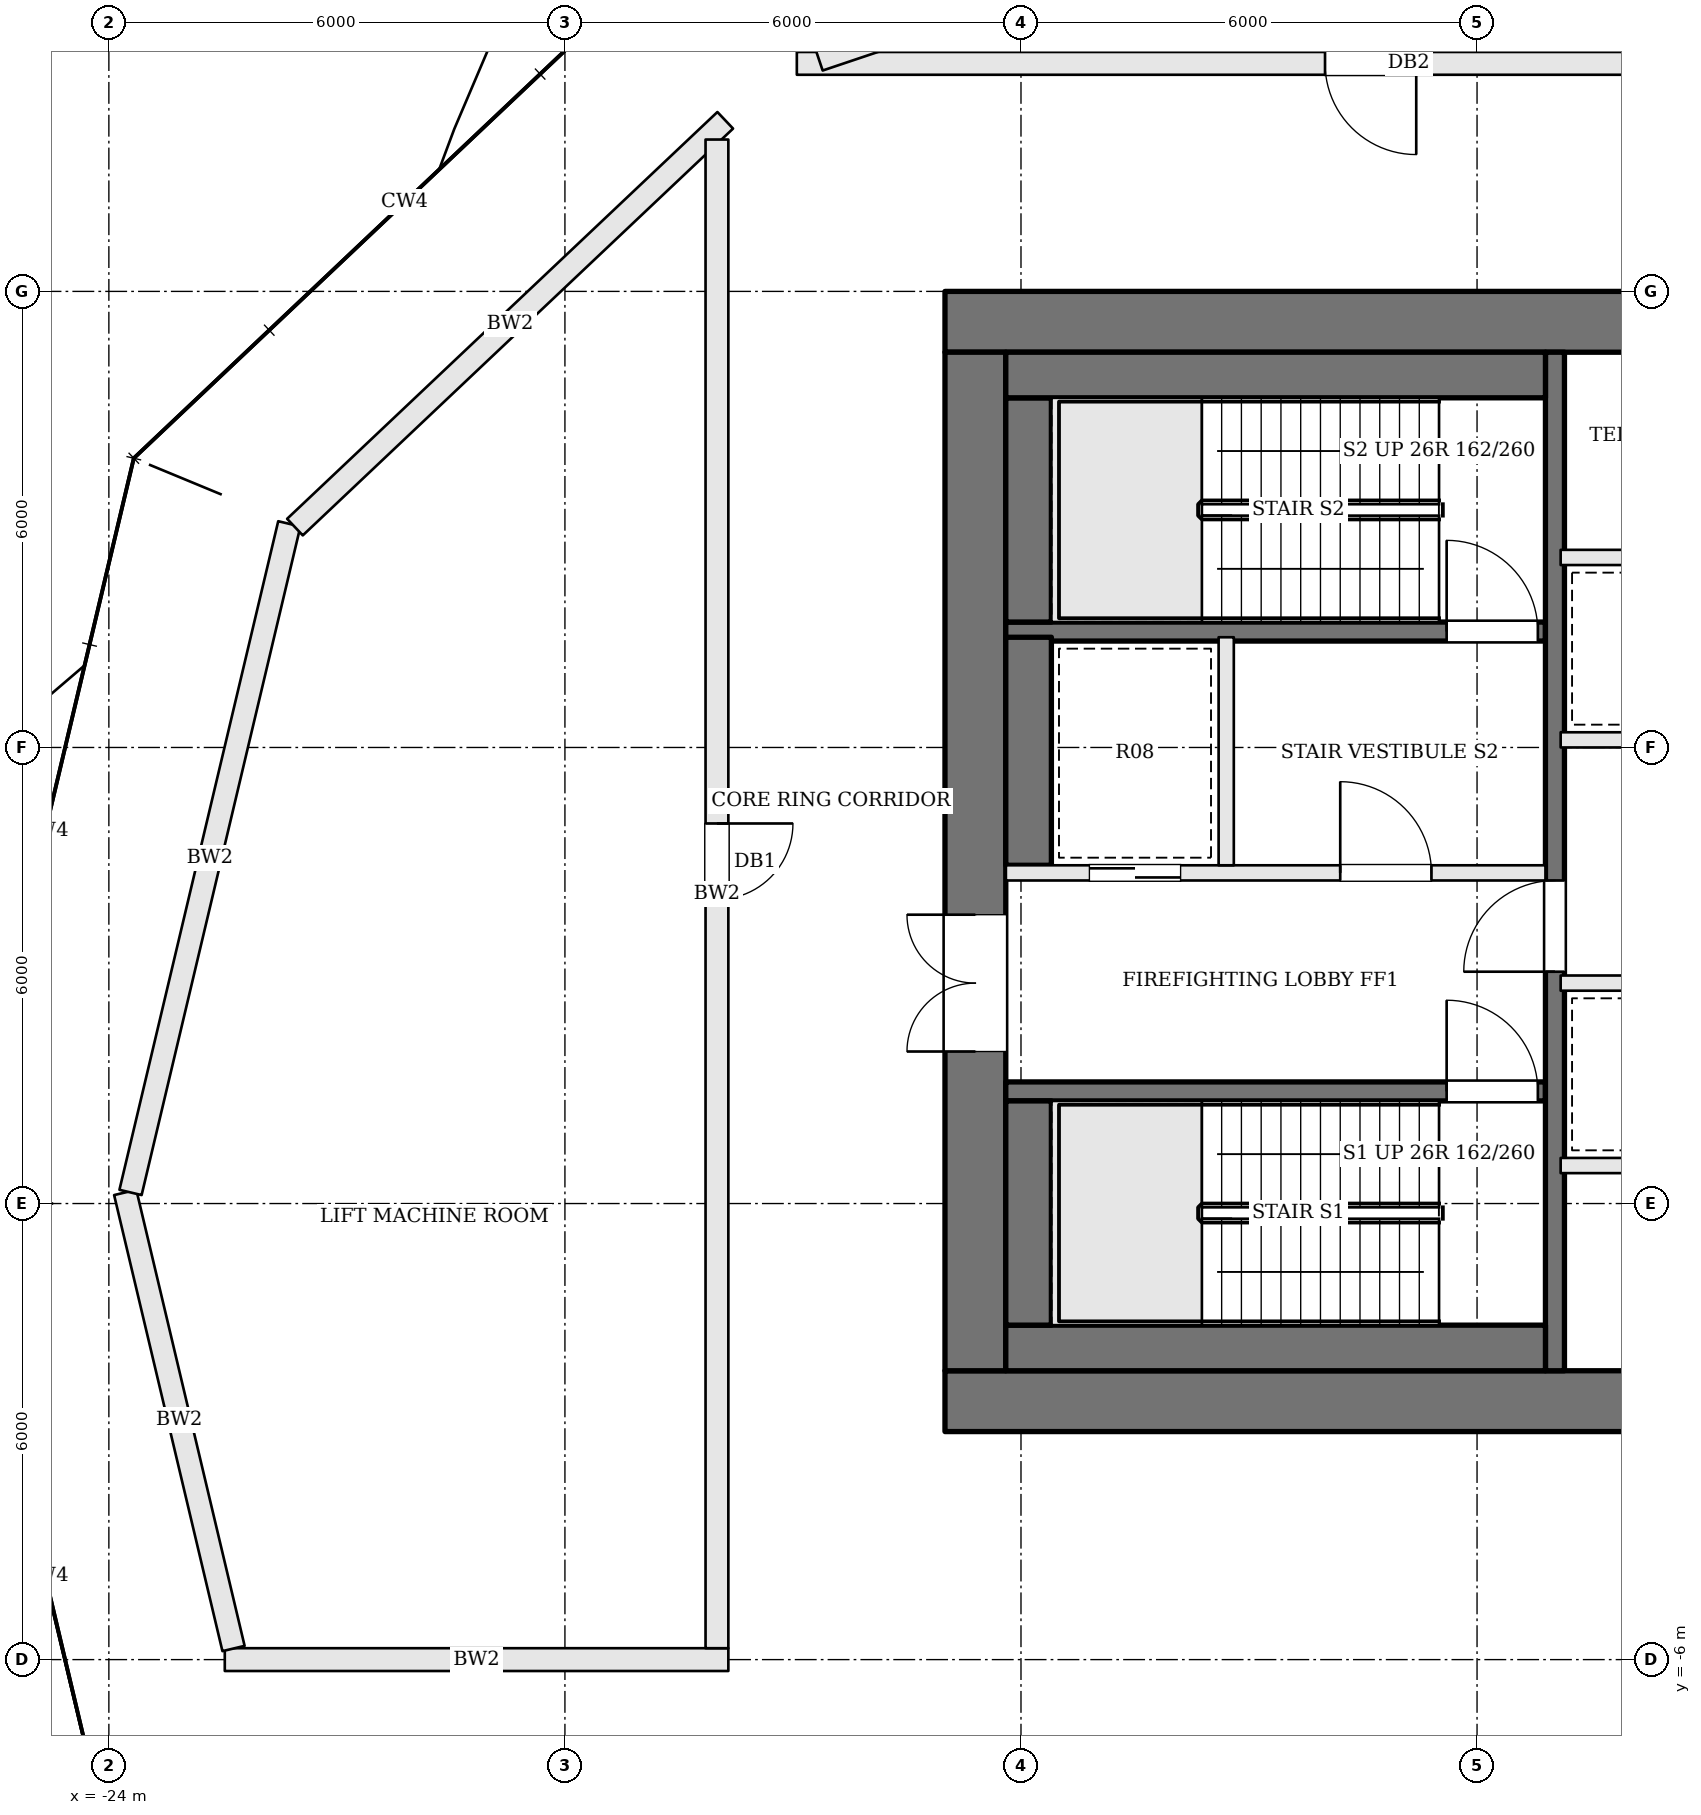
"""IFC4 building model, lengths in metres.
Left out: names, types, materials, properties, quantities, classifications, styles, units other than length and angle.
Written with IfcOpenShell. Run it as: python <this file> out.ifc"""

import sys

from ifc_helpers import new_model, si_unit, direction, frame, frame_2d, origin, place, context, subcontext, project, spatial, rectangle, extrude, element, fill, save


model = new_model("IFC4")
c1 = context("Model", 3, precision=1e-05, world=origin(), true_north=direction((0.0, 1.0)))
c2 = subcontext(c1, "Body", "Model", "MODEL_VIEW")
j1 = project(units=[si_unit("LENGTHUNIT", "METRE"), si_unit("PLANEANGLEUNIT", "RADIAN")], contexts=[c1])
p1 = place(None, origin())
s1 = spatial("IfcSite", under=j1, at=p1, CompositionType="ELEMENT")
p2 = place(p1, origin())
s2 = spatial("IfcBuilding", under=s1, at=p2, CompositionType="ELEMENT")
p3 = place(p2, frame((0.0, 0.0, 307.8)))
s3 = spatial("IfcBuildingStorey", under=s2, at=p3, CompositionType="ELEMENT", Elevation=307.8)
p4 = place(p3, frame((-13.0, 11.6, 0.0), z_axis=(0.0, 0.0, 1.0), x_axis=(1.0, 0.0, 0.0)))
e1 = element("IfcWall", 1, at=p4, inside=s3, PredefinedType="SHEAR", context=c2, shape_type="SweptSolid", body=[
    extrude(rectangle(XDim=26.0, YDim=0.8, at=frame_2d((13.0, 0.0))), origin(), (0.0, 0.0, 1.0), 4.2),
])
p5 = place(p4, frame((9.375, 0.0, 0.0)))
e2 = element("IfcOpeningElement", 2, at=p5, cuts=e1, PredefinedType="OPENING", context=c2, shape_type="SweptSolid", body=[
    extrude(rectangle(XDim=0.7, YDim=2.1, at=frame_2d((0.35, 1.05))), frame((0.0, 0.41, 0.0), z_axis=(0.0, -1.0, 0.0), x_axis=(1.0, 0.0, 0.0)), (0.0, 0.0, 1.0), 0.82),
])
p6 = place(p4, frame((12.375, 0.0, 0.0)))
e3 = element("IfcOpeningElement", 3, at=p6, cuts=e1, PredefinedType="OPENING", context=c2, shape_type="SweptSolid", body=[
    extrude(rectangle(XDim=1.2, YDim=2.1, at=frame_2d((0.6, 1.05))), frame((0.0, 0.41, 0.0), z_axis=(0.0, -1.0, 0.0), x_axis=(1.0, 0.0, 0.0)), (0.0, 0.0, 1.0), 0.82),
])
p7 = place(p4, frame((15.9, 0.0, 0.0)))
e4 = element("IfcOpeningElement", 4, at=p7, cuts=e1, PredefinedType="OPENING", context=c2, shape_type="SweptSolid", body=[
    extrude(rectangle(XDim=0.7, YDim=2.1, at=frame_2d((0.35, 1.05))), frame((0.0, 0.41, 0.0), z_axis=(0.0, -1.0, 0.0), x_axis=(1.0, 0.0, 0.0)), (0.0, 0.0, 1.0), 0.82),
])
p8 = place(p3, frame((-13.0, -2.6, 0.0), z_axis=(0.0, 0.0, 1.0), x_axis=(1.0, 0.0, 0.0)))
e5 = element("IfcWall", 5, at=p8, inside=s3, PredefinedType="SHEAR", context=c2, shape_type="SweptSolid", body=[
    extrude(rectangle(XDim=26.0, YDim=0.8, at=frame_2d((13.0, 0.0))), origin(), (0.0, 0.0, 1.0), 4.2),
])
p9 = place(p8, frame((9.125, 0.0, 0.0)))
e6 = element("IfcOpeningElement", 6, at=p9, cuts=e5, PredefinedType="OPENING", context=c2, shape_type="SweptSolid", body=[
    extrude(rectangle(XDim=1.2, YDim=2.1, at=frame_2d((0.6, 1.05))), frame((0.0, 0.41, 0.0), z_axis=(0.0, -1.0, 0.0), x_axis=(1.0, 0.0, 0.0)), (0.0, 0.0, 1.0), 0.82),
])
p10 = place(p8, frame((12.375, 0.0, 0.0)))
e7 = element("IfcOpeningElement", 7, at=p10, cuts=e5, PredefinedType="OPENING", context=c2, shape_type="SweptSolid", body=[
    extrude(rectangle(XDim=1.2, YDim=2.1, at=frame_2d((0.6, 1.05))), frame((0.0, 0.41, 0.0), z_axis=(0.0, -1.0, 0.0), x_axis=(1.0, 0.0, 0.0)), (0.0, 0.0, 1.0), 0.82),
])
p11 = place(p8, frame((15.9, 0.0, 0.0)))
e8 = element("IfcOpeningElement", 8, at=p11, cuts=e5, PredefinedType="OPENING", context=c2, shape_type="SweptSolid", body=[
    extrude(rectangle(XDim=0.7, YDim=2.1, at=frame_2d((0.35, 1.05))), frame((0.0, 0.41, 0.0), z_axis=(0.0, -1.0, 0.0), x_axis=(1.0, 0.0, 0.0)), (0.0, 0.0, 1.0), 0.82),
])
p12 = place(p3, frame((-12.6, -2.2, 0.0), z_axis=(0.0, 0.0, 1.0), x_axis=(0.0, 1.0, 0.0)))
e9 = element("IfcWall", 9, at=p12, inside=s3, PredefinedType="SHEAR", context=c2, shape_type="SweptSolid", body=[
    extrude(rectangle(XDim=13.4, YDim=0.8, at=frame_2d((6.7, 0.0))), origin(), (0.0, 0.0, 1.0), 4.2),
])
p13 = place(p12, frame((4.2, 0.0, 0.0)))
e10 = element("IfcOpeningElement", 10, at=p13, cuts=e9, PredefinedType="OPENING", context=c2, shape_type="SweptSolid", body=[
    extrude(rectangle(XDim=1.8, YDim=2.1, at=frame_2d((0.9, 1.05))), frame((0.0, 0.41, 0.0), z_axis=(0.0, -1.0, 0.0), x_axis=(1.0, 0.0, 0.0)), (0.0, 0.0, 1.0), 0.82),
])
p14 = place(p3, frame((-12.2, 1.475, 0.0), z_axis=(0.0, 0.0, 1.0), x_axis=(1.0, 0.0, 0.0)))
e11 = element("IfcWall", 11, at=p14, inside=s3, PredefinedType="SOLIDWALL", context=c2, shape_type="SweptSolid", body=[
    extrude(rectangle(XDim=7.1, YDim=0.25, at=frame_2d((3.55, 0.0))), origin(), (0.0, 0.0, 1.0), 4.0),
])
p15 = place(p14, frame((5.8, 0.0, 0.0)))
e12 = element("IfcOpeningElement", 12, at=p15, cuts=e11, PredefinedType="OPENING", context=c2, shape_type="SweptSolid", body=[
    extrude(rectangle(XDim=1.2, YDim=2.1, at=frame_2d((0.6, 1.05))), frame((0.0, 0.135, 0.0), z_axis=(0.0, -1.0, 0.0), x_axis=(1.0, 0.0, 0.0)), (0.0, 0.0, 1.0), 0.27),
])
p16 = place(p3, frame((-12.2, 4.35, 0.0), z_axis=(0.0, 0.0, 1.0), x_axis=(1.0, 0.0, 0.0)))
e13 = element("IfcWall", 13, at=p16, inside=s3, PredefinedType="SOLIDWALL", context=c2, shape_type="SweptSolid", body=[
    extrude(rectangle(XDim=7.1, YDim=0.2, at=frame_2d((3.55, 0.0))), origin(), (0.0, 0.0, 1.0), 4.0),
])
p17 = place(p16, frame((4.4, 0.0, 0.0)))
e14 = element("IfcOpeningElement", 14, at=p17, cuts=e13, PredefinedType="OPENING", context=c2, shape_type="SweptSolid", body=[
    extrude(rectangle(XDim=1.2, YDim=2.1, at=frame_2d((0.6, 1.05))), frame((0.0, 0.11, 0.0), z_axis=(0.0, -1.0, 0.0), x_axis=(1.0, 0.0, 0.0)), (0.0, 0.0, 1.0), 0.22),
])
p18 = place(p16, frame((1.1, 0.0, 0.0)))
e15 = element("IfcOpeningElement", 15, at=p18, cuts=e13, PredefinedType="OPENING", context=c2, shape_type="SweptSolid", body=[
    extrude(rectangle(XDim=1.2, YDim=2.1, at=frame_2d((0.6, 1.05))), frame((0.0, 0.11, 0.0), z_axis=(0.0, -1.0, 0.0), x_axis=(1.0, 0.0, 0.0)), (0.0, 0.0, 1.0), 0.22),
])
p19 = place(p3, frame((-12.2, 7.525, 0.0), z_axis=(0.0, 0.0, 1.0), x_axis=(1.0, 0.0, 0.0)))
e16 = element("IfcWall", 16, at=p19, inside=s3, PredefinedType="SOLIDWALL", context=c2, shape_type="SweptSolid", body=[
    extrude(rectangle(XDim=7.1, YDim=0.25, at=frame_2d((3.55, 0.0))), origin(), (0.0, 0.0, 1.0), 4.0),
])
p20 = place(p19, frame((5.8, 0.0, 0.0)))
e17 = element("IfcOpeningElement", 17, at=p20, cuts=e16, PredefinedType="OPENING", context=c2, shape_type="SweptSolid", body=[
    extrude(rectangle(XDim=1.2, YDim=2.1, at=frame_2d((0.6, 1.05))), frame((0.0, 0.135, 0.0), z_axis=(0.0, -1.0, 0.0), x_axis=(1.0, 0.0, 0.0)), (0.0, 0.0, 1.0), 0.27),
])
p21 = place(p3, frame((-9.3, 4.45, 0.0), z_axis=(0.0, 0.0, 1.0), x_axis=(0.0, 1.0, 0.0)))
e18 = element("IfcWall", 18, at=p21, inside=s3, PredefinedType="SOLIDWALL", context=c2, shape_type="SweptSolid", body=[
    extrude(rectangle(XDim=3.0, YDim=0.2, at=frame_2d((1.5, 0.0))), origin(), (0.0, 0.0, 1.0), 4.0),
])
p22 = place(p3, frame((-4.975, -2.2, 0.0), z_axis=(0.0, 0.0, 1.0), x_axis=(0.0, 1.0, 0.0)))
e19 = element("IfcWall", 19, at=p22, inside=s3, PredefinedType="SOLIDWALL", context=c2, shape_type="SweptSolid", body=[
    extrude(rectangle(XDim=13.4, YDim=0.25, at=frame_2d((6.7, 0.0))), origin(), (0.0, 0.0, 1.0), 4.0),
])
p23 = place(p22, frame((5.25, 0.0, 0.0)))
e20 = element("IfcOpeningElement", 20, at=p23, cuts=e19, PredefinedType="OPENING", context=c2, shape_type="SweptSolid", body=[
    extrude(rectangle(XDim=1.2, YDim=2.1, at=frame_2d((0.6, 1.05))), frame((0.0, 0.135, 0.0), z_axis=(0.0, -1.0, 0.0), x_axis=(1.0, 0.0, 0.0)), (0.0, 0.0, 1.0), 0.27),
])
p24 = place(p3, frame((-12.2, -1.9, 0.0), z_axis=(0.0, 0.0, 1.0), x_axis=(1.0, 0.0, 0.0)))
e21 = element("IfcWall", 21, at=p24, inside=s3, PredefinedType="SOLIDWALL", context=c2, shape_type="SweptSolid", body=[
    extrude(rectangle(XDim=7.1, YDim=0.6, at=frame_2d((3.55, 0.0))), origin(), (0.0, 0.0, 1.0), 4.0),
])
p25 = place(p3, frame((-11.9, -1.6, 0.0), z_axis=(0.0, 0.0, 1.0), x_axis=(0.0, 1.0, 0.0)))
e22 = element("IfcWall", 22, at=p25, inside=s3, PredefinedType="SOLIDWALL", context=c2, shape_type="SweptSolid", body=[
    extrude(rectangle(XDim=2.95, YDim=0.6, at=frame_2d((1.475, 0.0))), origin(), (0.0, 0.0, 1.0), 4.0),
])
p26 = place(p3, frame((-11.9, 4.45, 0.0), z_axis=(0.0, 0.0, 1.0), x_axis=(0.0, 1.0, 0.0)))
e23 = element("IfcWall", 23, at=p26, inside=s3, PredefinedType="SOLIDWALL", context=c2, shape_type="SweptSolid", body=[
    extrude(rectangle(XDim=3.0, YDim=0.6, at=frame_2d((1.5, 0.0))), origin(), (0.0, 0.0, 1.0), 4.0),
])
p27 = place(p3, frame((-11.9, 7.65, 0.0), z_axis=(0.0, 0.0, 1.0), x_axis=(0.0, 1.0, 0.0)))
e24 = element("IfcWall", 24, at=p27, inside=s3, PredefinedType="SOLIDWALL", context=c2, shape_type="SweptSolid", body=[
    extrude(rectangle(XDim=2.95, YDim=0.6, at=frame_2d((1.475, 0.0))), origin(), (0.0, 0.0, 1.0), 4.0),
])
p28 = place(p3, frame((-12.2, 10.9, 0.0), z_axis=(0.0, 0.0, 1.0), x_axis=(1.0, 0.0, 0.0)))
e25 = element("IfcWall", 25, at=p28, inside=s3, PredefinedType="SOLIDWALL", context=c2, shape_type="SweptSolid", body=[
    extrude(rectangle(XDim=7.1, YDim=0.6, at=frame_2d((3.55, 0.0))), origin(), (0.0, 0.0, 1.0), 4.0),
])
p29 = place(p3, frame((-4.9, 0.5, 0.0), z_axis=(0.0, 0.0, 1.0), x_axis=(1.0, 0.0, 0.0)))
e26 = element("IfcWall", 26, at=p29, inside=s3, PredefinedType="SOLIDWALL", context=c2, shape_type="SweptSolid", body=[
    extrude(rectangle(XDim=9.8, YDim=0.2, at=frame_2d((4.9, 0.0))), origin(), (0.0, 0.0, 1.0), 4.0),
])
p30 = place(p3, frame((-4.9, 2.9, 0.0), z_axis=(0.0, 0.0, 1.0), x_axis=(1.0, 0.0, 0.0)))
e27 = element("IfcWall", 27, at=p30, inside=s3, PredefinedType="SOLIDWALL", context=c2, shape_type="SweptSolid", body=[
    extrude(rectangle(XDim=9.8, YDim=0.2, at=frame_2d((4.9, 0.0))), origin(), (0.0, 0.0, 1.0), 4.0),
])
p31 = place(p30, frame((2.613, 0.0, 0.0)))
e28 = element("IfcOpeningElement", 28, at=p31, cuts=e27, PredefinedType="OPENING", context=c2, shape_type="SweptSolid", body=[
    extrude(rectangle(XDim=0.9, YDim=2.1, at=frame_2d((0.45, 1.05))), frame((0.0, 0.11, 0.0), z_axis=(0.0, -1.0, 0.0), x_axis=(1.0, 0.0, 0.0)), (0.0, 0.0, 1.0), 0.22),
])
p32 = place(p30, frame((7.463, 0.0, 0.0)))
e29 = element("IfcOpeningElement", 29, at=p32, cuts=e27, PredefinedType="OPENING", context=c2, shape_type="SweptSolid", body=[
    extrude(rectangle(XDim=1.0, YDim=2.1, at=frame_2d((0.5, 1.05))), frame((0.0, 0.11, 0.0), z_axis=(0.0, -1.0, 0.0), x_axis=(1.0, 0.0, 0.0)), (0.0, 0.0, 1.0), 0.22),
])
for number, where, z_axis, x_axis in (
    (30, (-4.9, 6.1, 0.0), (0.0, 0.0, 1.0), (1.0, 0.0, 0.0)),
    (31, (-4.9, 8.5, 0.0), (0.0, 0.0, 1.0), (1.0, 0.0, 0.0)),
):
    element("IfcWall", number, at=place(p3, frame(where, z_axis=z_axis, x_axis=x_axis)), inside=s3, PredefinedType="SOLIDWALL", context=c2, shape_type="SweptSolid", body=[
        extrude(rectangle(XDim=9.8, YDim=0.2, at=frame_2d((4.9, 0.0))), origin(), (0.0, 0.0, 1.0), 4.0),
    ])
p33 = place(p3, frame((-15.85, -6.0, 0.0), z_axis=(0.0, 0.0, 1.0), x_axis=(-1.0, 0.0, 0.0)))
e32 = element("IfcWall", 32, at=p33, inside=s3, PredefinedType="SOLIDWALL", context=c2, shape_type="SweptSolid", body=[
    extrude(rectangle(XDim=6.625, YDim=0.3, at=frame_2d((3.312, 0.0))), origin(), (0.0, 0.0, 1.0), 3.484),
])
p34 = place(p3, frame((-22.36, -5.854, 0.0), z_axis=(0.0, 0.0, 1.0), x_axis=(-0.231042450417, 0.972943670572, 0.0)))
e33 = element("IfcWall", 33, at=p34, inside=s3, PredefinedType="SOLIDWALL", context=c2, shape_type="SweptSolid", body=[
    extrude(rectangle(XDim=6.167, YDim=0.3, at=frame_2d((3.083, 0.0))), origin(), (0.0, 0.0, 1.0), 3.484),
])
p35 = place(p3, frame((-23.715, 0.146, 0.0), z_axis=(0.0, 0.0, 1.0), x_axis=(0.231081377849, 0.972934425751, 0.0)))
e34 = element("IfcWall", 34, at=p35, inside=s3, PredefinedType="SOLIDWALL", context=c2, shape_type="SweptSolid", body=[
    extrude(rectangle(XDim=9.041, YDim=0.3, at=frame_2d((4.52, 0.0))), origin(), (0.0, 0.0, 1.0), 3.484),
])
p36 = place(p3, frame((-21.552, 8.899, 0.0), z_axis=(0.0, 0.0, 1.0), x_axis=(0.726650636751, 0.687007170348, 0.0)))
e35 = element("IfcWall", 35, at=p36, inside=s3, PredefinedType="SOLIDWALL", context=c2, shape_type="SweptSolid", body=[
    extrude(rectangle(XDim=7.79, YDim=0.3, at=frame_2d((3.895, 0.0))), origin(), (0.0, 0.0, 1.0), 3.484),
])
p37 = place(p3, frame((-16.0, 13.998, 0.0), z_axis=(0.0, 0.0, 1.0), x_axis=(0.0, -1.0, 0.0)))
e36 = element("IfcWall", 36, at=p37, inside=s3, PredefinedType="SOLIDWALL", context=c2, shape_type="SweptSolid", body=[
    extrude(rectangle(XDim=19.848, YDim=0.3, at=frame_2d((9.924, 0.0))), origin(), (0.0, 0.0, 1.0), 3.484),
])
p38 = place(p37, frame((8.998, 0.0, 0.0)))
e37 = element("IfcOpeningElement", 37, at=p38, cuts=e36, PredefinedType="OPENING", context=c2, shape_type="SweptSolid", body=[
    extrude(rectangle(XDim=1.0, YDim=2.1, at=frame_2d((0.5, 1.05))), frame((0.0, 0.16, 0.0), z_axis=(0.0, -1.0, 0.0), x_axis=(1.0, 0.0, 0.0)), (0.0, 0.0, 1.0), 0.32),
])
p39 = place(p3, frame((14.949, 15.0, 0.0), z_axis=(0.0, 0.0, 1.0), x_axis=(-1.0, 0.0, 0.0)))
e38 = element("IfcWall", 38, at=p39, inside=s3, PredefinedType="SOLIDWALL", context=c2, shape_type="SweptSolid", body=[
    extrude(rectangle(XDim=29.898, YDim=0.3, at=frame_2d((14.949, 0.0))), origin(), (0.0, 0.0, 1.0), 3.484),
])
p40 = place(p39, frame((21.749, 0.0, 0.0)))
e39 = element("IfcOpeningElement", 39, at=p40, cuts=e38, PredefinedType="OPENING", context=c2, shape_type="SweptSolid", body=[
    extrude(rectangle(XDim=1.2, YDim=2.1, at=frame_2d((0.6, 1.05))), frame((0.0, 0.16, 0.0), z_axis=(0.0, -1.0, 0.0), x_axis=(1.0, 0.0, 0.0)), (0.0, 0.0, 1.0), 0.32),
])
p41 = place(p39, frame((6.949, 0.0, 0.0)))
e40 = element("IfcOpeningElement", 40, at=p41, cuts=e38, PredefinedType="OPENING", context=c2, shape_type="SweptSolid", body=[
    extrude(rectangle(XDim=1.2, YDim=2.1, at=frame_2d((0.6, 1.05))), frame((0.0, 0.16, 0.0), z_axis=(0.0, -1.0, 0.0), x_axis=(1.0, 0.0, 0.0)), (0.0, 0.0, 1.0), 0.32),
])
p42 = place(p3, frame((-14.657, 15.048, 0.0), z_axis=(0.0, 0.0, 1.0), x_axis=(0.947876681806, 0.318637405352, 0.0)))
e41 = element("IfcWall", 41, at=p42, inside=s3, PredefinedType="SOLIDWALL", context=c2, shape_type="SweptSolid", body=[
    extrude(rectangle(XDim=7.717, YDim=0.3, at=frame_2d((3.859, 0.0))), origin(), (0.0, 0.0, 1.0), 3.484),
])
p43 = place(p13, origin())
e42 = element("IfcDoor", 42, at=p43, inside=s3, OperationType="DOUBLE_DOOR_SINGLE_SWING", PredefinedType="DOOR", context=c2, shape_type="SweptSolid", body=[
    extrude(rectangle(XDim=1.8, YDim=2.1, at=frame_2d((0.9, 1.05))), frame((0.0, 0.025, 0.0), z_axis=(0.0, -1.0, 0.0), x_axis=(1.0, 0.0, 0.0)), (0.0, 0.0, 1.0), 0.05),
])
fill(e10, e42)
p44 = place(p23, origin())
e43 = element("IfcDoor", 43, at=p44, inside=s3, OperationType="SINGLE_SWING_LEFT", PredefinedType="DOOR", context=c2, shape_type="SweptSolid", body=[
    extrude(rectangle(XDim=1.2, YDim=2.1, at=frame_2d((0.6, 1.05))), frame((0.0, 0.025, 0.0), z_axis=(0.0, -1.0, 0.0), x_axis=(1.0, 0.0, 0.0)), (0.0, 0.0, 1.0), 0.05),
])
fill(e20, e43)
p45 = place(p17, origin())
e44 = element("IfcDoor", 44, at=p45, inside=s3, OperationType="SINGLE_SWING_LEFT", PredefinedType="DOOR", context=c2, shape_type="SweptSolid", body=[
    extrude(rectangle(XDim=1.2, YDim=2.1, at=frame_2d((0.6, 1.05))), frame((0.0, 0.025, 0.0), z_axis=(0.0, -1.0, 0.0), x_axis=(1.0, 0.0, 0.0)), (0.0, 0.0, 1.0), 0.05),
])
fill(e14, e44)
p46 = place(p15, origin())
e45 = element("IfcDoor", 45, at=p46, inside=s3, OperationType="SINGLE_SWING_LEFT", PredefinedType="DOOR", context=c2, shape_type="SweptSolid", body=[
    extrude(rectangle(XDim=1.2, YDim=2.1, at=frame_2d((0.6, 1.05))), frame((0.0, 0.025, 0.0), z_axis=(0.0, -1.0, 0.0), x_axis=(1.0, 0.0, 0.0)), (0.0, 0.0, 1.0), 0.05),
])
fill(e12, e45)
p47 = place(p20, origin())
e46 = element("IfcDoor", 46, at=p47, inside=s3, OperationType="SINGLE_SWING_LEFT", PredefinedType="DOOR", context=c2, shape_type="SweptSolid", body=[
    extrude(rectangle(XDim=1.2, YDim=2.1, at=frame_2d((0.6, 1.05))), frame((0.0, 0.025, 0.0), z_axis=(0.0, -1.0, 0.0), x_axis=(1.0, 0.0, 0.0)), (0.0, 0.0, 1.0), 0.05),
])
fill(e17, e46)
p48 = place(p18, origin())
e47 = element("IfcDoor", 47, at=p48, inside=s3, OperationType="SLIDING_TO_RIGHT", PredefinedType="DOOR", context=c2, shape_type="SweptSolid", body=[
    extrude(rectangle(XDim=1.2, YDim=2.1, at=frame_2d((0.6, 1.05))), frame((0.0, 0.025, 0.0), z_axis=(0.0, -1.0, 0.0), x_axis=(1.0, 0.0, 0.0)), (0.0, 0.0, 1.0), 0.05),
])
fill(e15, e47)
p49 = place(p38, origin())
e48 = element("IfcDoor", 48, at=p49, inside=s3, OperationType="SINGLE_SWING_LEFT", PredefinedType="DOOR", context=c2, shape_type="SweptSolid", body=[
    extrude(rectangle(XDim=1.0, YDim=2.1, at=frame_2d((0.5, 1.05))), frame((0.0, 0.025, 0.0), z_axis=(0.0, -1.0, 0.0), x_axis=(1.0, 0.0, 0.0)), (0.0, 0.0, 1.0), 0.05),
])
fill(e37, e48)
p50 = place(p40, origin())
e49 = element("IfcDoor", 49, at=p50, inside=s3, OperationType="SINGLE_SWING_LEFT", PredefinedType="DOOR", context=c2, shape_type="SweptSolid", body=[
    extrude(rectangle(XDim=1.2, YDim=2.1, at=frame_2d((0.6, 1.05))), frame((0.0, 0.025, 0.0), z_axis=(0.0, -1.0, 0.0), x_axis=(1.0, 0.0, 0.0)), (0.0, 0.0, 1.0), 0.05),
])
fill(e39, e49)
save(model, sys.argv[1])
